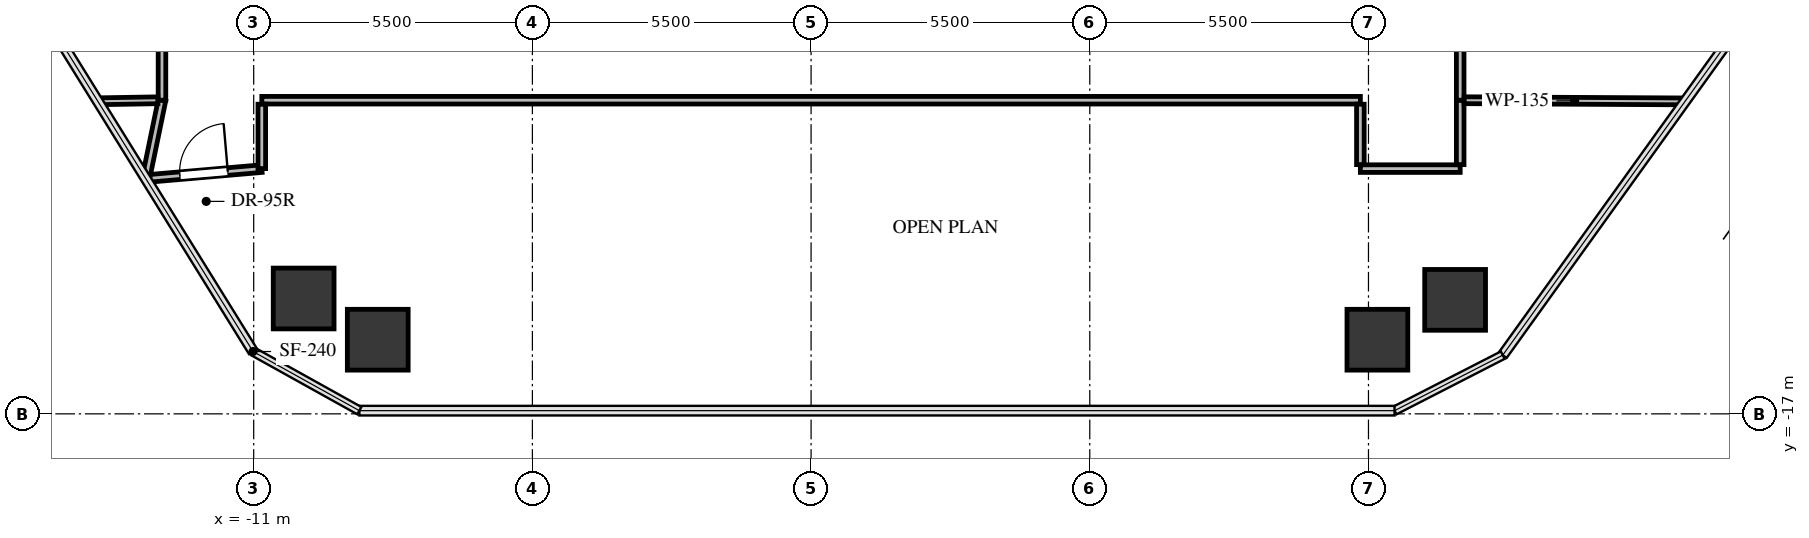
"""IFC4 building model, lengths in metres.
Left out: names, types, materials, properties, quantities, classifications, styles, units other than length and angle.
Written with IfcOpenShell. Run it as: python <this file> out.ifc"""

import sys

from ifc_helpers import new_model, si_unit, direction, frame, frame_2d, origin, origin_2d, place, context, subcontext, project, spatial, rectangle, extrude, source, transform, mapped, element, fill, save


model = new_model("IFC4")
c1 = context("Model", 3, precision=1e-05, world=origin(), true_north=direction((0.0, 1.0)))
c2 = subcontext(c1, "Body", "Model", "MODEL_VIEW")
j1 = project(units=[si_unit("LENGTHUNIT", "METRE"), si_unit("PLANEANGLEUNIT", "RADIAN")], contexts=[c1])
p1 = place(None, origin())
s1 = spatial("IfcSite", under=j1, at=p1, CompositionType="ELEMENT")
p2 = place(p1, origin())
s2 = spatial("IfcBuilding", under=s1, at=p2, CompositionType="ELEMENT")
p3 = place(p2, frame((0.0, 0.0, 97.5)))
s3 = spatial("IfcBuildingStorey", under=s2, at=p3, CompositionType="ELEMENT", Elevation=97.5)
m1 = source(origin(), c2, "Body", "SweptSolid", [
    extrude(rectangle(XDim=1.2, YDim=1.2, at=origin_2d()), origin(), (0.0, 0.0, 1.0), 3.3),
])
for number, where, z_axis, x_axis in (
    (1, (-10.014, -14.723, -0.24), (0.0, 0.0, 1.0), (1.0, 0.0, 0.0)),
    (2, (12.71, -14.75, -0.24), (0.0, 0.0, 1.0), (1.0, 0.0, 0.0)),
    (3, (11.176, -15.537, -0.24), (0.0, 0.0, 1.0), (1.0, 0.0, 0.0)),
    (4, (-8.552, -15.537, -0.24), (0.0, 0.0, 1.0), (1.0, 0.0, 0.0)),
):
    element("IfcColumn", number, at=place(p3, frame(where, z_axis=z_axis, x_axis=x_axis)), inside=s3, PredefinedType="COLUMN", context=c2, shape_type="MappedRepresentation", body=[
        mapped(m1, transform((0.0, 0.0, 0.0), x_axis=(1.0, 0.0, 0.0), y_axis=(0.0, 1.0, 0.0), z_axis=(0.0, 0.0, 1.0), scale=1.0)),
    ])
p4 = place(p3, frame((-10.84, -10.81, 0.0), z_axis=(0.0, 0.0, 1.0), x_axis=(1.0, 0.0, 0.0)))
e5 = element("IfcWall", 5, at=p4, inside=s3, PredefinedType="PARTITIONING", context=c2, shape_type="SweptSolid", body=[
    extrude(rectangle(XDim=21.68, YDim=0.15, at=frame_2d((10.84, 0.0))), origin(), (0.0, 0.0, 1.0), 2.212),
])
p5 = place(p3, frame((-13.129, -12.358, 0.0), z_axis=(0.0, 0.0, 1.0), x_axis=(0.996279168698, 0.086184789953, 0.0)))
e6 = element("IfcWall", 6, at=p5, inside=s3, PredefinedType="PARTITIONING", context=c2, shape_type="SweptSolid", body=[
    extrude(rectangle(XDim=2.297, YDim=0.15, at=frame_2d((1.149, 0.0))), origin(), (0.0, 0.0, 1.0), 2.38),
])
p6 = place(p5, frame((0.674, 0.0, 0.0)))
e7 = element("IfcOpeningElement", 7, at=p6, cuts=e6, PredefinedType="OPENING", context=c2, shape_type="SweptSolid", body=[
    extrude(rectangle(XDim=0.95, YDim=2.1, at=frame_2d((0.475, 1.05))), frame((0.0, 0.085, 0.0), z_axis=(0.0, -1.0, 0.0), x_axis=(1.0, 0.0, 0.0)), (0.0, 0.0, 1.0), 0.17),
])
p7 = place(p3, frame((10.84, -12.16, 0.0), z_axis=(0.0, 0.0, 1.0), x_axis=(1.0, 0.0, 0.0)))
e8 = element("IfcWall", 8, at=p7, inside=s3, PredefinedType="PARTITIONING", context=c2, shape_type="SweptSolid", body=[
    extrude(rectangle(XDim=1.97, YDim=0.15, at=frame_2d((0.985, 0.0))), origin(), (0.0, 0.0, 1.0), 3.045),
])
p8 = place(p3, frame((-12.81, -10.81, 0.0), z_axis=(0.0, 0.0, 1.0), x_axis=(-0.201786289638, -0.979429575474, 0.0)))
e9 = element("IfcWall", 9, at=p8, inside=s3, PredefinedType="PARTITIONING", context=c2, shape_type="SweptSolid", body=[
    extrude(rectangle(XDim=1.498, YDim=0.15, at=frame_2d((0.749, 0.0))), origin(), (0.0, 0.0, 1.0), 3.045),
])
p9 = place(p3, frame((-10.84, -12.16, 0.0), z_axis=(0.0, 0.0, 1.0), x_axis=(0.0, 1.0, 0.0)))
e10 = element("IfcWall", 10, at=p9, inside=s3, PredefinedType="PARTITIONING", context=c2, shape_type="SweptSolid", body=[
    extrude(rectangle(XDim=1.271, YDim=0.15, at=frame_2d((0.635, 0.0))), origin(), (0.0, 0.0, 1.0), 3.045),
])
p10 = place(p3, frame((10.84, -10.889, 0.0), z_axis=(0.0, 0.0, 1.0), x_axis=(0.0, -1.0, 0.0)))
e11 = element("IfcWall", 11, at=p10, inside=s3, PredefinedType="PARTITIONING", context=c2, shape_type="SweptSolid", body=[
    extrude(rectangle(XDim=1.192, YDim=0.15, at=frame_2d((0.596, 0.0))), origin(), (0.0, 0.0, 1.0), 3.045),
])
p11 = place(p3, frame((12.81, -12.081, 0.0), z_axis=(0.0, 0.0, 1.0), x_axis=(0.0, 1.0, 0.0)))
e12 = element("IfcWall", 12, at=p11, inside=s3, PredefinedType="PARTITIONING", context=c2, shape_type="SweptSolid", body=[
    extrude(rectangle(XDim=1.271, YDim=0.15, at=frame_2d((0.635, 0.0))), origin(), (0.0, 0.0, 1.0), 3.045),
])
p12 = place(p3, frame((-12.81, 10.81, 0.0), z_axis=(0.0, 0.0, 1.0), x_axis=(0.0, -1.0, 0.0)))
e13 = element("IfcWall", 13, at=p12, inside=s3, PredefinedType="PARTITIONING", context=c2, shape_type="SweptSolid", body=[
    extrude(rectangle(XDim=21.62, YDim=0.15, at=frame_2d((10.81, 0.0))), origin(), (0.0, 0.0, 1.0), 2.212),
])
p13 = place(p12, frame((10.35, 0.0, 0.0)))
e14 = element("IfcOpeningElement", 14, at=p13, cuts=e13, PredefinedType="OPENING", context=c2, shape_type="SweptSolid", body=[
    extrude(rectangle(XDim=0.92, YDim=2.1, at=frame_2d((0.46, 1.05))), frame((0.0, 0.085, 0.0), z_axis=(0.0, -1.0, 0.0), x_axis=(1.0, 0.0, 0.0)), (0.0, 0.0, 1.0), 0.17),
])
p14 = place(p3, frame((12.81, -10.81, 0.0), z_axis=(0.0, 0.0, 1.0), x_axis=(0.0, 1.0, 0.0)))
e15 = element("IfcWall", 15, at=p14, inside=s3, PredefinedType="PARTITIONING", context=c2, shape_type="SweptSolid", body=[
    extrude(rectangle(XDim=2.37, YDim=0.15, at=frame_2d((1.185, 0.0))), origin(), (0.0, 0.0, 1.0), 3.045),
])
p15 = place(p3, frame((-14.076, -10.831, 0.0), z_axis=(0.0, 0.0, 1.0), x_axis=(0.999860796611, 0.016684945308, 0.0)))
e16 = element("IfcWall", 16, at=p15, inside=s3, PredefinedType="PARTITIONING", context=c2, shape_type="SweptSolid", body=[
    extrude(rectangle(XDim=1.185, YDim=0.135, at=frame_2d((0.593, 0.0))), origin(), (0.0, 0.0, 1.0), 3.045),
])
p16 = place(p3, frame((12.889, -10.81, 0.0), z_axis=(0.0, 0.0, 1.0), x_axis=(0.999986140562, -0.005264853658, 0.0)))
e17 = element("IfcWall", 17, at=p16, inside=s3, PredefinedType="PARTITIONING", context=c2, shape_type="SweptSolid", body=[
    extrude(rectangle(XDim=4.359, YDim=0.135, at=frame_2d((2.179, 0.0))), origin(), (0.0, 0.0, 1.0), 2.38),
])
m2 = source(origin(), c2, "Body", "SweptSolid", [
    extrude(rectangle(XDim=0.95, YDim=2.1, at=frame_2d((0.475, 1.05))), frame((0.0, 0.025, 0.0), z_axis=(0.0, -1.0, 0.0), x_axis=(1.0, 0.0, 0.0)), (0.0, 0.0, 1.0), 0.05),
])
p17 = place(p6, origin())
e18 = element("IfcDoor", 18, at=p17, inside=s3, OperationType="SINGLE_SWING_RIGHT", PredefinedType="DOOR", context=c2, shape_type="MappedRepresentation", body=[
    mapped(m2, transform((0.0, 0.0, 0.0), x_axis=(1.0, 0.0, 0.0), y_axis=(0.0, 1.0, 0.0), z_axis=(0.0, 0.0, 1.0), scale=1.0)),
])
fill(e7, e18)
save(model, sys.argv[1])
